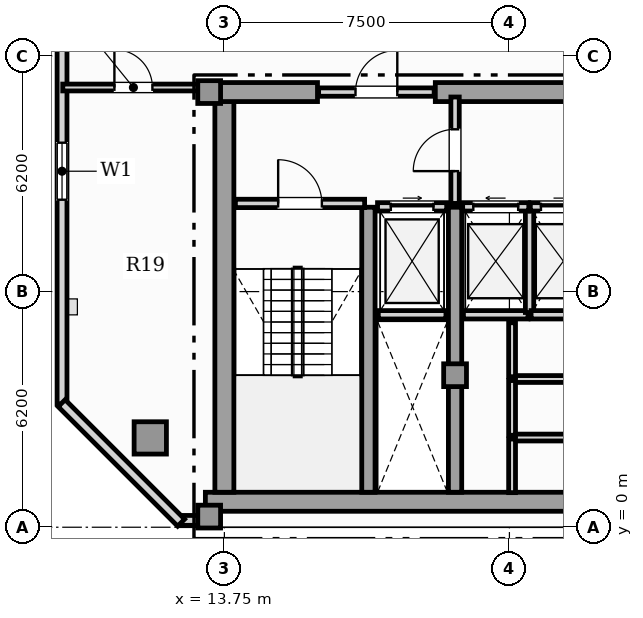
"""IFC4 building model, lengths in metres.
Left out: names, types, materials, properties, quantities, classifications, styles, units other than length and angle.
Written with IfcOpenShell. Run it as: python <this file> out.ifc"""

import sys

from ifc_helpers import new_model, si_unit, direction, frame, frame_2d, origin, origin_2d, place, context, subcontext, project, spatial, rectangle, hollow_rectangle, extrude, element, fill, save


model = new_model("IFC4")
c1 = context("Model", 3, precision=1e-05, world=origin(), true_north=direction((0.0, 1.0)))
c2 = subcontext(c1, "Body", "Model", "MODEL_VIEW")
j1 = project(units=[si_unit("LENGTHUNIT", "METRE"), si_unit("PLANEANGLEUNIT", "RADIAN")], contexts=[c1])
p1 = place(None, origin())
s1 = spatial("IfcSite", under=j1, at=p1, CompositionType="ELEMENT")
p2 = place(p1, origin())
s2 = spatial("IfcBuilding", under=s1, at=p2, CompositionType="ELEMENT")
p3 = place(p2, frame((0.0, 0.0, 337.5)))
s3 = spatial("IfcBuildingStorey", under=s2, at=p3, CompositionType="ELEMENT", Elevation=337.5)
p4 = place(p3, frame((13.25, 0.67, 0.0), z_axis=(0.0, 0.0, 1.0), x_axis=(1.0, 0.0, 0.0)))
e1 = element("IfcWall", 1, at=p4, inside=s3, PredefinedType="SHEAR", context=c2, shape_type="SweptSolid", body=[
    extrude(rectangle(XDim=31.0, YDim=0.5, at=frame_2d((15.5, 0.0))), origin(), (0.0, 0.0, 1.0), 3.63),
])
p5 = place(p3, frame((13.75, 0.92, 0.0), z_axis=(0.0, 0.0, 1.0), x_axis=(0.0, 1.0, 0.0)))
e2 = element("IfcWall", 2, at=p5, inside=s3, PredefinedType="SHEAR", context=c2, shape_type="SweptSolid", body=[
    extrude(rectangle(XDim=10.53, YDim=0.5, at=frame_2d((5.265, 0.0))), origin(), (0.0, 0.0, 1.0), 3.63),
])
p6 = place(p3, frame((13.25, 11.45, 0.0), z_axis=(0.0, 0.0, 1.0), x_axis=(1.0, 0.0, 0.0)))
e3 = element("IfcWall", 3, at=p6, inside=s3, PredefinedType="SHEAR", context=c2, shape_type="SweptSolid", body=[
    extrude(rectangle(XDim=2.95, YDim=0.5, at=frame_2d((1.475, 0.0))), origin(), (0.0, 0.0, 1.0), 3.63),
])
p7 = place(p3, frame((19.3, 11.45, 0.0), z_axis=(0.0, 0.0, 1.0), x_axis=(1.0, 0.0, 0.0)))
e4 = element("IfcWall", 4, at=p7, inside=s3, PredefinedType="SHEAR", context=c2, shape_type="SweptSolid", body=[
    extrude(rectangle(XDim=7.3, YDim=0.5, at=frame_2d((3.65, 0.0))), origin(), (0.0, 0.0, 1.0), 3.63),
])
for number, where, z_axis, x_axis in (
    (5, (17.54, 0.92, 0.0), (0.0, 0.0, 1.0), (0.0, 1.0, 0.0)),
    (6, (19.82, 0.92, 0.0), (0.0, 0.0, 1.0), (0.0, 1.0, 0.0)),
):
    element("IfcWall", number, at=place(p3, frame(where, z_axis=z_axis, x_axis=x_axis)), inside=s3, PredefinedType="SHEAR", context=c2, shape_type="SweptSolid", body=[
        extrude(rectangle(XDim=7.5, YDim=0.35, at=frame_2d((3.75, 0.0))), origin(), (0.0, 0.0, 1.0), 3.63),
    ])
for number, where, z_axis, x_axis in (
    (7, (13.35, 0.28, 0.0), (0.0, 0.0, 1.0), (1.0, 0.0, 0.0)),
    (8, (13.35, 11.45, 0.0), (0.0, 0.0, 1.0), (1.0, 0.0, 0.0)),
    (9, (19.82, 4.0, 0.0), (0.0, 0.0, 1.0), (1.0, 0.0, 0.0)),
):
    element("IfcColumn", number, at=place(p3, frame(where, z_axis=z_axis, x_axis=x_axis)), inside=s3, PredefinedType="COLUMN", context=c2, shape_type="SweptSolid", body=[
        extrude(rectangle(XDim=0.6, YDim=0.6, at=origin_2d()), origin(), (0.0, 0.0, 1.0), 3.85),
    ])
p8 = place(p3, frame((11.8, 2.35, 0.0), z_axis=(0.0, 0.0, 1.0), x_axis=(1.0, 0.0, 0.0)))
e10 = element("IfcColumn", 10, at=p8, inside=s3, PredefinedType="USERDEFINED", context=c2, shape_type="SweptSolid", body=[
    extrude(hollow_rectangle(XDim=0.85, YDim=0.85, WallThickness=0.05, at=origin_2d()), origin(), (0.0, 0.0, 1.0), 3.85),
])
p9 = place(p3, frame((12.588, 0.18, 0.0), z_axis=(0.0, 0.0, 1.0), x_axis=(1.0, 0.0, 0.0)))
e11 = element("IfcWall", 11, at=p9, inside=s3, PredefinedType="SOLIDWALL", context=c2, shape_type="SweptSolid", body=[
    extrude(rectangle(XDim=0.662, YDim=0.26, at=frame_2d((0.331, 0.0))), origin(), (0.0, 0.0, 1.0), 3.63),
])
p10 = place(p3, frame((9.479, 28.614, 0.0), z_axis=(0.0, 0.0, 1.0), x_axis=(0.0, -1.0, 0.0)))
e12 = element("IfcWall", 12, at=p10, inside=s3, PredefinedType="SOLIDWALL", context=c2, shape_type="SweptSolid", body=[
    extrude(rectangle(XDim=25.374, YDim=0.26, at=frame_2d((12.687, 0.0))), origin(), (0.0, 0.0, 1.0), 3.63),
])
p11 = place(p10, frame((18.497, 0.0, 0.9)))
e13 = element("IfcOpeningElement", 13, at=p11, cuts=e12, PredefinedType="OPENING", context=c2, shape_type="SweptSolid", body=[
    extrude(rectangle(XDim=1.5, YDim=1.95, at=frame_2d((0.75, 0.975))), frame((0.0, 0.14, 0.0), z_axis=(0.0, -1.0, 0.0), x_axis=(1.0, 0.0, 0.0)), (0.0, 0.0, 1.0), 0.28),
])
p12 = place(p10, frame((2.77, 0.0, 0.95)))
e14 = element("IfcOpeningElement", 14, at=p12, cuts=e12, PredefinedType="OPENING", context=c2, shape_type="SweptSolid", body=[
    extrude(rectangle(XDim=0.9, YDim=1.5, at=frame_2d((0.45, 0.75))), frame((0.0, 0.14, 0.0), z_axis=(0.0, -1.0, 0.0), x_axis=(1.0, 0.0, 0.0)), (0.0, 0.0, 1.0), 0.28),
])
p13 = place(p10, frame((9.997, 0.0, 0.9)))
e15 = element("IfcOpeningElement", 15, at=p13, cuts=e12, PredefinedType="OPENING", context=c2, shape_type="SweptSolid", body=[
    extrude(rectangle(XDim=1.5, YDim=1.95, at=frame_2d((0.75, 0.975))), frame((0.0, 0.14, 0.0), z_axis=(0.0, -1.0, 0.0), x_axis=(1.0, 0.0, 0.0)), (0.0, 0.0, 1.0), 0.28),
])
p14 = place(p10, frame((6.264, 0.0, 0.9)))
e16 = element("IfcOpeningElement", 16, at=p14, cuts=e12, PredefinedType="OPENING", context=c2, shape_type="SweptSolid", body=[
    extrude(rectangle(XDim=1.5, YDim=1.95, at=frame_2d((0.75, 0.975))), frame((0.0, 0.14, 0.0), z_axis=(0.0, -1.0, 0.0), x_axis=(1.0, 0.0, 0.0)), (0.0, 0.0, 1.0), 0.28),
])
p15 = place(p3, frame((9.469, 3.264, 0.0), z_axis=(0.0, 0.0, 1.0), x_axis=(0.707106781187, -0.707106781187, 0.0)))
e17 = element("IfcWall", 17, at=p15, inside=s3, PredefinedType="SOLIDWALL", context=c2, shape_type="SweptSolid", body=[
    extrude(rectangle(XDim=4.446, YDim=0.26, at=frame_2d((2.223, 0.0))), origin(), (0.0, 0.0, 1.0), 3.63),
])
p16 = place(p3, frame((17.8, 5.59, 0.0), z_axis=(0.0, 0.0, 1.0), x_axis=(1.0, 0.0, 0.0)))
e18 = element("IfcWall", 18, at=p16, inside=s3, PredefinedType="SOLIDWALL", context=c2, shape_type="SweptSolid", body=[
    extrude(rectangle(XDim=1.78, YDim=0.22, at=frame_2d((0.89, 0.0))), origin(), (0.0, 0.0, 1.0), 3.63),
])
p17 = place(p3, frame((17.78, 8.43, 0.0), z_axis=(0.0, 0.0, 1.0), x_axis=(1.0, 0.0, 0.0)))
e19 = element("IfcWall", 19, at=p17, inside=s3, PredefinedType="SOLIDWALL", context=c2, shape_type="SweptSolid", body=[
    extrude(rectangle(XDim=1.82, YDim=0.22, at=frame_2d((0.91, 0.0))), origin(), (0.0, 0.0, 1.0), 3.63),
])
p18 = place(p17, frame((0.35, 0.0, 0.0)))
e20 = element("IfcOpeningElement", 20, at=p18, cuts=e19, PredefinedType="OPENING", context=c2, shape_type="SweptSolid", body=[
    extrude(rectangle(XDim=1.12, YDim=2.25, at=frame_2d((0.56, 1.125))), frame((0.0, 0.12, 0.0), z_axis=(0.0, -1.0, 0.0), x_axis=(1.0, 0.0, 0.0)), (0.0, 0.0, 1.0), 0.24),
])
p19 = place(p3, frame((20.04, 5.59, 0.0), z_axis=(0.0, 0.0, 1.0), x_axis=(1.0, 0.0, 0.0)))
e21 = element("IfcWall", 21, at=p19, inside=s3, PredefinedType="SOLIDWALL", context=c2, shape_type="SweptSolid", body=[
    extrude(rectangle(XDim=1.7, YDim=0.22, at=frame_2d((0.85, 0.0))), origin(), (0.0, 0.0, 1.0), 3.63),
])
p20 = place(p3, frame((21.78, 5.65, 0.0), z_axis=(0.0, 0.0, 1.0), x_axis=(0.0, 1.0, 0.0)))
e22 = element("IfcWall", 22, at=p20, inside=s3, PredefinedType="SOLIDWALL", context=c2, shape_type="SweptSolid", body=[
    extrude(rectangle(XDim=2.7, YDim=0.22, at=frame_2d((1.35, 0.0))), origin(), (0.0, 0.0, 1.0), 3.63),
])
p21 = place(p3, frame((20.02, 8.43, 0.0), z_axis=(0.0, 0.0, 1.0), x_axis=(1.0, 0.0, 0.0)))
e23 = element("IfcWall", 23, at=p21, inside=s3, PredefinedType="SOLIDWALL", context=c2, shape_type="SweptSolid", body=[
    extrude(rectangle(XDim=1.74, YDim=0.22, at=frame_2d((0.87, 0.0))), origin(), (0.0, 0.0, 1.0), 3.63),
])
p22 = place(p21, frame((0.28, 0.0, 0.0)))
e24 = element("IfcOpeningElement", 24, at=p22, cuts=e23, PredefinedType="OPENING", context=c2, shape_type="SweptSolid", body=[
    extrude(rectangle(XDim=1.18, YDim=2.2, at=frame_2d((0.59, 1.1))), frame((0.0, 0.12, 0.0), z_axis=(0.0, -1.0, 0.0), x_axis=(1.0, 0.0, 0.0)), (0.0, 0.0, 1.0), 0.24),
])
p23 = place(p3, frame((21.82, 5.59, 0.0), z_axis=(0.0, 0.0, 1.0), x_axis=(1.0, 0.0, 0.0)))
e25 = element("IfcWall", 25, at=p23, inside=s3, PredefinedType="SOLIDWALL", context=c2, shape_type="SweptSolid", body=[
    extrude(rectangle(XDim=1.7, YDim=0.22, at=frame_2d((0.85, 0.0))), origin(), (0.0, 0.0, 1.0), 3.63),
])
p24 = place(p3, frame((21.8, 8.43, 0.0), z_axis=(0.0, 0.0, 1.0), x_axis=(1.0, 0.0, 0.0)))
e26 = element("IfcWall", 26, at=p24, inside=s3, PredefinedType="SOLIDWALL", context=c2, shape_type="SweptSolid", body=[
    extrude(rectangle(XDim=1.74, YDim=0.22, at=frame_2d((0.87, 0.0))), origin(), (0.0, 0.0, 1.0), 3.63),
])
p25 = place(p24, frame((0.28, 0.0, 0.0)))
e27 = element("IfcOpeningElement", 27, at=p25, cuts=e26, PredefinedType="OPENING", context=c2, shape_type="SweptSolid", body=[
    extrude(rectangle(XDim=1.18, YDim=2.2, at=frame_2d((0.59, 1.1))), frame((0.0, 0.12, 0.0), z_axis=(0.0, -1.0, 0.0), x_axis=(1.0, 0.0, 0.0)), (0.0, 0.0, 1.0), 0.24),
])
p26 = place(p3, frame((14.04, 8.52, 0.0), z_axis=(0.0, 0.0, 1.0), x_axis=(1.0, 0.0, 0.0)))
e28 = element("IfcWall", 28, at=p26, inside=s3, PredefinedType="SOLIDWALL", context=c2, shape_type="SweptSolid", body=[
    extrude(rectangle(XDim=3.4, YDim=0.22, at=frame_2d((1.7, 0.0))), origin(), (0.0, 0.0, 1.0), 3.63),
])
p27 = place(p26, frame((1.125, 0.0, 0.0)))
e29 = element("IfcOpeningElement", 29, at=p27, cuts=e28, PredefinedType="OPENING", context=c2, shape_type="SweptSolid", body=[
    extrude(rectangle(XDim=1.15, YDim=2.2, at=frame_2d((0.575, 1.1))), frame((0.0, 0.12, 0.0), z_axis=(0.0, -1.0, 0.0), x_axis=(1.0, 0.0, 0.0)), (0.0, 0.0, 1.0), 0.24),
])
p28 = place(p3, frame((19.82, 8.52, 0.0), z_axis=(0.0, 0.0, 1.0), x_axis=(0.0, 1.0, 0.0)))
e30 = element("IfcWall", 30, at=p28, inside=s3, PredefinedType="SOLIDWALL", context=c2, shape_type="SweptSolid", body=[
    extrude(rectangle(XDim=2.8, YDim=0.22, at=frame_2d((1.4, 0.0))), origin(), (0.0, 0.0, 1.0), 3.085),
])
p29 = place(p28, frame((0.85, 0.0, 0.0)))
e31 = element("IfcOpeningElement", 31, at=p29, cuts=e30, PredefinedType="OPENING", context=c2, shape_type="SweptSolid", body=[
    extrude(rectangle(XDim=1.1, YDim=2.2, at=frame_2d((0.55, 1.1))), frame((0.0, 0.12, 0.0), z_axis=(0.0, -1.0, 0.0), x_axis=(1.0, 0.0, 0.0)), (0.0, 0.0, 1.0), 0.24),
])
p30 = place(p3, frame((16.23, 11.45, 0.0), z_axis=(0.0, 0.0, 1.0), x_axis=(1.0, 0.0, 0.0)))
e32 = element("IfcWall", 32, at=p30, inside=s3, PredefinedType="SOLIDWALL", context=c2, shape_type="SweptSolid", body=[
    extrude(rectangle(XDim=3.04, YDim=0.22, at=frame_2d((1.52, 0.0))), origin(), (0.0, 0.0, 1.0), 3.63),
])
p31 = place(p30, frame((0.97, 0.0, 0.0)))
e33 = element("IfcOpeningElement", 33, at=p31, cuts=e32, PredefinedType="OPENING", context=c2, shape_type="SweptSolid", body=[
    extrude(rectangle(XDim=1.1, YDim=2.2, at=frame_2d((0.55, 1.1))), frame((0.0, 0.12, 0.0), z_axis=(0.0, -1.0, 0.0), x_axis=(1.0, 0.0, 0.0)), (0.0, 0.0, 1.0), 0.24),
])
p32 = place(p3, frame((21.36, 2.36, 0.0), z_axis=(0.0, 0.0, 1.0), x_axis=(1.0, 0.0, 0.0)))
e34 = element("IfcWall", 34, at=p32, inside=s3, PredefinedType="PARTITIONING", context=c2, shape_type="SweptSolid", body=[
    extrude(rectangle(XDim=3.94, YDim=0.18, at=frame_2d((1.97, 0.0))), origin(), (0.0, 0.0, 1.0), 3.63),
])
p33 = place(p3, frame((21.32, 0.91, 0.0), z_axis=(0.0, 0.0, 1.0), x_axis=(0.0, 1.0, 0.0)))
e35 = element("IfcWall", 35, at=p33, inside=s3, PredefinedType="PARTITIONING", context=c2, shape_type="SweptSolid", body=[
    extrude(rectangle(XDim=1.41, YDim=0.18, at=frame_2d((0.705, 0.0))), origin(), (0.0, 0.0, 1.0), 3.63),
])
p34 = place(p3, frame((21.36, 3.9, 0.0), z_axis=(0.0, 0.0, 1.0), x_axis=(1.0, 0.0, 0.0)))
e36 = element("IfcWall", 36, at=p34, inside=s3, PredefinedType="PARTITIONING", context=c2, shape_type="SweptSolid", body=[
    extrude(rectangle(XDim=3.94, YDim=0.18, at=frame_2d((1.97, 0.0))), origin(), (0.0, 0.0, 1.0), 3.63),
])
p35 = place(p3, frame((21.32, 2.42, 0.0), z_axis=(0.0, 0.0, 1.0), x_axis=(0.0, 1.0, 0.0)))
e37 = element("IfcWall", 37, at=p35, inside=s3, PredefinedType="PARTITIONING", context=c2, shape_type="SweptSolid", body=[
    extrude(rectangle(XDim=1.44, YDim=0.18, at=frame_2d((0.72, 0.0))), origin(), (0.0, 0.0, 1.0), 3.63),
])
p36 = place(p3, frame((21.32, 3.96, 0.0), z_axis=(0.0, 0.0, 1.0), x_axis=(0.0, 1.0, 0.0)))
e38 = element("IfcWall", 38, at=p36, inside=s3, PredefinedType="PARTITIONING", context=c2, shape_type="SweptSolid", body=[
    extrude(rectangle(XDim=1.42, YDim=0.18, at=frame_2d((0.71, 0.0))), origin(), (0.0, 0.0, 1.0), 3.63),
])
p37 = place(p3, frame((9.498, 11.57, 0.0), z_axis=(0.0, 0.0, 1.0), x_axis=(1.0, 0.0, 0.0)))
e39 = element("IfcWall", 39, at=p37, inside=s3, PredefinedType="PARTITIONING", context=c2, shape_type="SweptSolid", body=[
    extrude(rectangle(XDim=3.717, YDim=0.18, at=frame_2d((1.859, 0.0))), origin(), (0.0, 0.0, 1.0), 3.63),
])
p38 = place(p37, frame((1.359, 0.0, 0.0)))
e40 = element("IfcOpeningElement", 40, at=p38, cuts=e39, PredefinedType="OPENING", context=c2, shape_type="SweptSolid", body=[
    extrude(rectangle(XDim=1.0, YDim=2.15, at=frame_2d((0.5, 1.075))), frame((0.0, 0.1, 0.0), z_axis=(0.0, -1.0, 0.0), x_axis=(1.0, 0.0, 0.0)), (0.0, 0.0, 1.0), 0.2),
])
p39 = place(p11, origin())
e41 = element("IfcWindow", 41, at=p39, inside=s3, PartitioningType="SINGLE_PANEL", PredefinedType="WINDOW", context=c2, shape_type="SweptSolid", body=[
    extrude(rectangle(XDim=1.5, YDim=1.95, at=frame_2d((0.75, 0.975))), frame((0.0, 0.03, 0.0), z_axis=(0.0, -1.0, 0.0), x_axis=(1.0, 0.0, 0.0)), (0.0, 0.0, 1.0), 0.06),
])
fill(e13, e41)
p40 = place(p18, origin())
e42 = element("IfcDoor", 42, at=p40, inside=s3, OperationType="SLIDING_TO_RIGHT", PredefinedType="DOOR", context=c2, shape_type="SweptSolid", body=[
    extrude(rectangle(XDim=1.12, YDim=2.25, at=frame_2d((0.56, 1.125))), frame((0.0, 0.025, 0.0), z_axis=(0.0, -1.0, 0.0), x_axis=(1.0, 0.0, 0.0)), (0.0, 0.0, 1.0), 0.05),
])
fill(e20, e42)
p41 = place(p22, origin())
e43 = element("IfcDoor", 43, at=p41, inside=s3, OperationType="SLIDING_TO_LEFT", PredefinedType="DOOR", context=c2, shape_type="SweptSolid", body=[
    extrude(rectangle(XDim=1.18, YDim=2.2, at=frame_2d((0.59, 1.1))), frame((0.0, 0.025, 0.0), z_axis=(0.0, -1.0, 0.0), x_axis=(1.0, 0.0, 0.0)), (0.0, 0.0, 1.0), 0.05),
])
fill(e24, e43)
p42 = place(p25, origin())
e44 = element("IfcDoor", 44, at=p42, inside=s3, OperationType="SLIDING_TO_RIGHT", PredefinedType="DOOR", context=c2, shape_type="SweptSolid", body=[
    extrude(rectangle(XDim=1.18, YDim=2.2, at=frame_2d((0.59, 1.1))), frame((0.0, 0.025, 0.0), z_axis=(0.0, -1.0, 0.0), x_axis=(1.0, 0.0, 0.0)), (0.0, 0.0, 1.0), 0.05),
])
fill(e27, e44)
p43 = place(p27, origin())
e45 = element("IfcDoor", 45, at=p43, inside=s3, OperationType="SINGLE_SWING_LEFT", PredefinedType="DOOR", context=c2, shape_type="SweptSolid", body=[
    extrude(rectangle(XDim=1.15, YDim=2.2, at=frame_2d((0.575, 1.1))), frame((0.0, 0.025, 0.0), z_axis=(0.0, -1.0, 0.0), x_axis=(1.0, 0.0, 0.0)), (0.0, 0.0, 1.0), 0.05),
])
fill(e29, e45)
p44 = place(p29, origin())
e46 = element("IfcDoor", 46, at=p44, inside=s3, OperationType="SINGLE_SWING_LEFT", PredefinedType="DOOR", context=c2, shape_type="SweptSolid", body=[
    extrude(rectangle(XDim=1.1, YDim=2.2, at=frame_2d((0.55, 1.1))), frame((0.0, 0.025, 0.0), z_axis=(0.0, -1.0, 0.0), x_axis=(1.0, 0.0, 0.0)), (0.0, 0.0, 1.0), 0.05),
])
fill(e31, e46)
p45 = place(p31, origin())
e47 = element("IfcDoor", 47, at=p45, inside=s3, OperationType="SINGLE_SWING_RIGHT", PredefinedType="DOOR", context=c2, shape_type="SweptSolid", body=[
    extrude(rectangle(XDim=1.1, YDim=2.2, at=frame_2d((0.55, 1.1))), frame((0.0, 0.025, 0.0), z_axis=(0.0, -1.0, 0.0), x_axis=(1.0, 0.0, 0.0)), (0.0, 0.0, 1.0), 0.05),
])
fill(e33, e47)
p46 = place(p38, origin())
e48 = element("IfcDoor", 48, at=p46, inside=s3, OperationType="SINGLE_SWING_LEFT", PredefinedType="DOOR", context=c2, shape_type="SweptSolid", body=[
    extrude(rectangle(XDim=1.0, YDim=2.15, at=frame_2d((0.5, 1.075))), frame((0.0, 0.025, 0.0), z_axis=(0.0, -1.0, 0.0), x_axis=(1.0, 0.0, 0.0)), (0.0, 0.0, 1.0), 0.05),
])
fill(e40, e48)
save(model, sys.argv[1])
